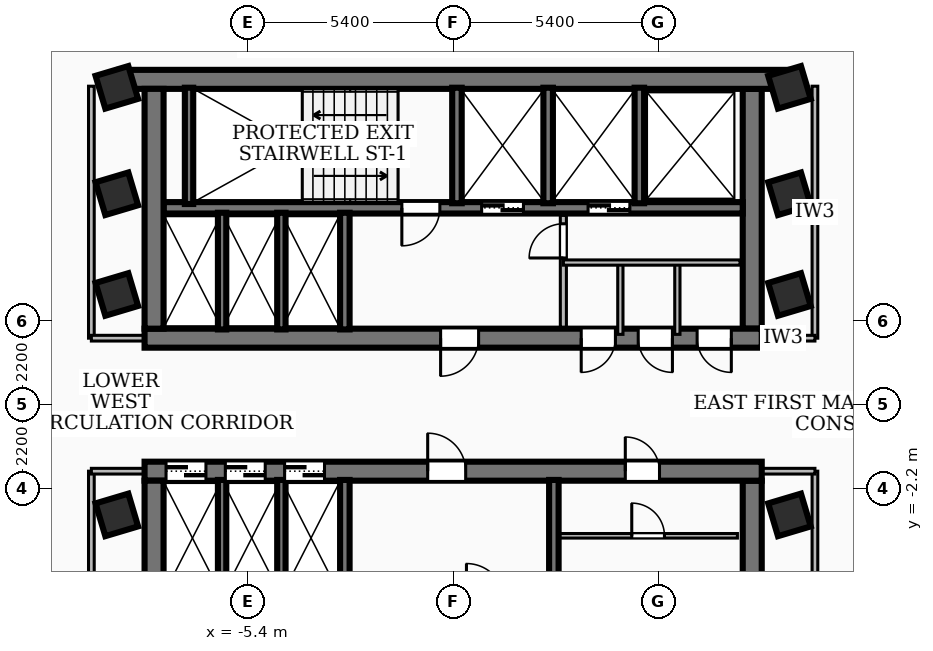
"""IFC4 building model, lengths in metres.
Left out: names, types, materials, properties, quantities, classifications, styles, units other than length and angle.
Written with IfcOpenShell. Run it as: python <this file> out.ifc"""

import sys

from ifc_helpers import new_model, si_unit, direction, frame, frame_2d, origin, origin_2d, place, context, subcontext, project, spatial, rectangle, extrude, element, fill, save


model = new_model("IFC4")
c1 = context("Model", 3, precision=1e-05, world=origin(), true_north=direction((0.0, 1.0)))
c2 = subcontext(c1, "Body", "Model", "MODEL_VIEW")
j1 = project(units=[si_unit("LENGTHUNIT", "METRE"), si_unit("PLANEANGLEUNIT", "RADIAN")], contexts=[c1])
p1 = place(None, origin())
s1 = spatial("IfcSite", under=j1, at=p1, CompositionType="ELEMENT")
p2 = place(p1, origin())
s2 = spatial("IfcBuilding", under=s1, at=p2, CompositionType="ELEMENT")
p3 = place(p2, frame((0.0, 0.0, 141.48)))
s3 = spatial("IfcBuildingStorey", under=s2, at=p3, CompositionType="ELEMENT", Elevation=141.48)
p4 = place(p3, frame((-8.78, 8.56, 0.0), z_axis=(0.0, 0.0, 1.0), x_axis=(1.0, 0.0, 0.0)))
e1 = element("IfcWall", 1, at=p4, inside=s3, PredefinedType="SHEAR", context=c2, shape_type="SweptSolid", body=[
    extrude(rectangle(XDim=17.56, YDim=0.5, at=frame_2d((8.78, 0.0))), origin(), (0.0, 0.0, 1.0), 3.32),
])
p5 = place(p3, frame((8.12, 1.75, 0.0), z_axis=(0.0, 0.0, 1.0), x_axis=(-1.0, 0.0, 0.0)))
e2 = element("IfcWall", 2, at=p5, inside=s3, PredefinedType="SHEAR", context=c2, shape_type="SweptSolid", body=[
    extrude(rectangle(XDim=16.24, YDim=0.5, at=frame_2d((8.12, 0.0))), origin(), (0.0, 0.0, 1.0), 3.32),
])
p6 = place(p5, frame((7.45, 0.0, 0.0)))
e3 = element("IfcOpeningElement", 3, at=p6, cuts=e2, PredefinedType="OPENING", context=c2, shape_type="SweptSolid", body=[
    extrude(rectangle(XDim=1.0, YDim=2.1, at=frame_2d((0.5, 1.05))), frame((0.0, 0.26, 0.0), z_axis=(0.0, -1.0, 0.0), x_axis=(1.0, 0.0, 0.0)), (0.0, 0.0, 1.0), 0.52),
])
p7 = place(p5, frame((3.85, 0.0, 0.0)))
e4 = element("IfcOpeningElement", 4, at=p7, cuts=e2, PredefinedType="OPENING", context=c2, shape_type="SweptSolid", body=[
    extrude(rectangle(XDim=0.9, YDim=2.06, at=frame_2d((0.45, 1.03))), frame((0.0, 0.26, 0.0), z_axis=(0.0, -1.0, 0.0), x_axis=(1.0, 0.0, 0.0)), (0.0, 0.0, 1.0), 0.52),
])
p8 = place(p5, frame((2.35, 0.0, 0.0)))
e5 = element("IfcOpeningElement", 5, at=p8, cuts=e2, PredefinedType="OPENING", context=c2, shape_type="SweptSolid", body=[
    extrude(rectangle(XDim=0.9, YDim=2.06, at=frame_2d((0.45, 1.03))), frame((0.0, 0.26, 0.0), z_axis=(0.0, -1.0, 0.0), x_axis=(1.0, 0.0, 0.0)), (0.0, 0.0, 1.0), 0.52),
])
p9 = place(p5, frame((0.8, 0.0, 0.0)))
e6 = element("IfcOpeningElement", 6, at=p9, cuts=e2, PredefinedType="OPENING", context=c2, shape_type="SweptSolid", body=[
    extrude(rectangle(XDim=0.9, YDim=2.06, at=frame_2d((0.45, 1.03))), frame((0.0, 0.26, 0.0), z_axis=(0.0, -1.0, 0.0), x_axis=(1.0, 0.0, 0.0)), (0.0, 0.0, 1.0), 0.52),
])
for number, where, z_axis, x_axis in (
    (7, (-7.87, 2.0, 0.0), (0.0, 0.0, 1.0), (0.0, 1.0, 0.0)),
    (8, (7.87, 8.31, 0.0), (0.0, 0.0, 1.0), (0.0, -1.0, 0.0)),
):
    element("IfcWall", number, at=place(p3, frame(where, z_axis=z_axis, x_axis=x_axis)), inside=s3, PredefinedType="SHEAR", context=c2, shape_type="SweptSolid", body=[
        extrude(rectangle(XDim=6.31, YDim=0.5, at=frame_2d((3.155, 0.0))), origin(), (0.0, 0.0, 1.0), 3.32),
    ])
p10 = place(p3, frame((7.62, 5.18, 0.0), z_axis=(0.0, 0.0, 1.0), x_axis=(-1.0, 0.0, 0.0)))
e9 = element("IfcWall", 9, at=p10, inside=s3, PredefinedType="SOLIDWALL", context=c2, shape_type="SweptSolid", body=[
    extrude(rectangle(XDim=15.24, YDim=0.3, at=frame_2d((7.62, 0.0))), origin(), (0.0, 0.0, 1.0), 3.32),
])
p11 = place(p10, frame((5.77, 0.0, 0.0)))
e10 = element("IfcOpeningElement", 10, at=p11, cuts=e9, PredefinedType="OPENING", context=c2, shape_type="SweptSolid", body=[
    extrude(rectangle(XDim=1.1, YDim=2.15, at=frame_2d((0.55, 1.075))), frame((0.0, 0.16, 0.0), z_axis=(0.0, -1.0, 0.0), x_axis=(1.0, 0.0, 0.0)), (0.0, 0.0, 1.0), 0.32),
])
p12 = place(p10, frame((2.97, 0.0, 0.0)))
e11 = element("IfcOpeningElement", 11, at=p12, cuts=e9, PredefinedType="OPENING", context=c2, shape_type="SweptSolid", body=[
    extrude(rectangle(XDim=1.1, YDim=2.15, at=frame_2d((0.55, 1.075))), frame((0.0, 0.16, 0.0), z_axis=(0.0, -1.0, 0.0), x_axis=(1.0, 0.0, 0.0)), (0.0, 0.0, 1.0), 0.32),
])
p13 = place(p10, frame((7.97, 0.0, 0.0)))
e12 = element("IfcOpeningElement", 12, at=p13, cuts=e9, PredefinedType="OPENING", context=c2, shape_type="SweptSolid", body=[
    extrude(rectangle(XDim=1.0, YDim=2.1, at=frame_2d((0.5, 1.05))), frame((0.0, 0.16, 0.0), z_axis=(0.0, -1.0, 0.0), x_axis=(1.0, 0.0, 0.0)), (0.0, 0.0, 1.0), 0.32),
])
p14 = place(p3, frame((-8.12, -1.75, 0.0), z_axis=(0.0, 0.0, 1.0), x_axis=(1.0, 0.0, 0.0)))
e13 = element("IfcWall", 13, at=p14, inside=s3, PredefinedType="SHEAR", context=c2, shape_type="SweptSolid", body=[
    extrude(rectangle(XDim=16.24, YDim=0.5, at=frame_2d((8.12, 0.0))), origin(), (0.0, 0.0, 1.0), 3.32),
])
p15 = place(p14, frame((7.45, 0.0, 0.0)))
e14 = element("IfcOpeningElement", 14, at=p15, cuts=e13, PredefinedType="OPENING", context=c2, shape_type="SweptSolid", body=[
    extrude(rectangle(XDim=1.0, YDim=2.1, at=frame_2d((0.5, 1.05))), frame((0.0, 0.26, 0.0), z_axis=(0.0, -1.0, 0.0), x_axis=(1.0, 0.0, 0.0)), (0.0, 0.0, 1.0), 0.52),
])
p16 = place(p14, frame((12.65, 0.0, 0.0)))
e15 = element("IfcOpeningElement", 15, at=p16, cuts=e13, PredefinedType="OPENING", context=c2, shape_type="SweptSolid", body=[
    extrude(rectangle(XDim=0.9, YDim=2.06, at=frame_2d((0.45, 1.03))), frame((0.0, 0.26, 0.0), z_axis=(0.0, -1.0, 0.0), x_axis=(1.0, 0.0, 0.0)), (0.0, 0.0, 1.0), 0.52),
])
p17 = place(p14, frame((0.565, 0.0, 0.0)))
e16 = element("IfcOpeningElement", 16, at=p17, cuts=e13, PredefinedType="OPENING", context=c2, shape_type="SweptSolid", body=[
    extrude(rectangle(XDim=1.05, YDim=2.15, at=frame_2d((0.525, 1.075))), frame((0.0, 0.26, 0.0), z_axis=(0.0, -1.0, 0.0), x_axis=(1.0, 0.0, 0.0)), (0.0, 0.0, 1.0), 0.52),
])
p18 = place(p14, frame((2.125, 0.0, 0.0)))
e17 = element("IfcOpeningElement", 17, at=p18, cuts=e13, PredefinedType="OPENING", context=c2, shape_type="SweptSolid", body=[
    extrude(rectangle(XDim=1.05, YDim=2.15, at=frame_2d((0.525, 1.075))), frame((0.0, 0.26, 0.0), z_axis=(0.0, -1.0, 0.0), x_axis=(1.0, 0.0, 0.0)), (0.0, 0.0, 1.0), 0.52),
])
p19 = place(p14, frame((3.685, 0.0, 0.0)))
e18 = element("IfcOpeningElement", 18, at=p19, cuts=e13, PredefinedType="OPENING", context=c2, shape_type="SweptSolid", body=[
    extrude(rectangle(XDim=1.05, YDim=2.15, at=frame_2d((0.525, 1.075))), frame((0.0, 0.26, 0.0), z_axis=(0.0, -1.0, 0.0), x_axis=(1.0, 0.0, 0.0)), (0.0, 0.0, 1.0), 0.52),
])
for number, where, z_axis, x_axis in (
    (19, (-7.87, -8.31, 0.0), (0.0, 0.0, 1.0), (0.0, 1.0, 0.0)),
    (20, (7.87, -2.0, 0.0), (0.0, 0.0, 1.0), (0.0, -1.0, 0.0)),
):
    element("IfcWall", number, at=place(p3, frame(where, z_axis=z_axis, x_axis=x_axis)), inside=s3, PredefinedType="SHEAR", context=c2, shape_type="SweptSolid", body=[
        extrude(rectangle(XDim=6.31, YDim=0.5, at=frame_2d((3.155, 0.0))), origin(), (0.0, 0.0, 1.0), 3.32),
    ])
p20 = place(p3, frame((-6.95, 5.28, 0.0), z_axis=(0.0, 0.0, 1.0), x_axis=(0.0, 1.0, 0.0)))
e21 = element("IfcWall", 21, at=p20, inside=s3, PredefinedType="SOLIDWALL", context=c2, shape_type="SweptSolid", body=[
    extrude(rectangle(XDim=3.06, YDim=0.22, at=frame_2d((1.53, 0.0))), origin(), (0.0, 0.0, 1.0), 3.32),
])
for number, where, z_axis, x_axis in (
    (22, (0.1, 5.3, 0.0), (0.0, 0.0, 1.0), (0.0, 1.0, 0.0)),
    (23, (2.5, 5.3, 0.0), (0.0, 0.0, 1.0), (0.0, 1.0, 0.0)),
    (24, (4.9, 5.3, 0.0), (0.0, 0.0, 1.0), (0.0, 1.0, 0.0)),
):
    element("IfcWall", number, at=place(p3, frame(where, z_axis=z_axis, x_axis=x_axis)), inside=s3, PredefinedType="SOLIDWALL", context=c2, shape_type="SweptSolid", body=[
        extrude(rectangle(XDim=3.04, YDim=0.25, at=frame_2d((1.52, 0.0))), origin(), (0.0, 0.0, 1.0), 3.32),
    ])
for number, where, z_axis, x_axis in (
    (25, (-2.85, 1.98, 0.0), (0.0, 0.0, 1.0), (0.0, 1.0, 0.0)),
    (26, (-2.85, -5.05, 0.0), (0.0, 0.0, 1.0), (0.0, 1.0, 0.0)),
    (27, (2.65, -5.05, 0.0), (0.0, 0.0, 1.0), (0.0, 1.0, 0.0)),
):
    element("IfcWall", number, at=place(p3, frame(where, z_axis=z_axis, x_axis=x_axis)), inside=s3, PredefinedType="SOLIDWALL", context=c2, shape_type="SweptSolid", body=[
        extrude(rectangle(XDim=3.07, YDim=0.25, at=frame_2d((1.535, 0.0))), origin(), (0.0, 0.0, 1.0), 3.32),
    ])
for number, where, z_axis, x_axis in (
    (28, (-6.08, 1.98, 0.0), (0.0, 0.0, 1.0), (0.0, 1.0, 0.0)),
    (29, (-4.52, 1.98, 0.0), (0.0, 0.0, 1.0), (0.0, 1.0, 0.0)),
    (30, (-6.08, -5.05, 0.0), (0.0, 0.0, 1.0), (0.0, 1.0, 0.0)),
    (31, (-4.52, -5.05, 0.0), (0.0, 0.0, 1.0), (0.0, 1.0, 0.0)),
):
    element("IfcWall", number, at=place(p3, frame(where, z_axis=z_axis, x_axis=x_axis)), inside=s3, PredefinedType="SOLIDWALL", context=c2, shape_type="SweptSolid", body=[
        extrude(rectangle(XDim=3.07, YDim=0.22, at=frame_2d((1.535, 0.0))), origin(), (0.0, 0.0, 1.0), 3.32),
    ])
for number, where, z_axis, x_axis in (
    (32, (-8.85, -2.9, 0.0), (0.0, 0.0, 1.0), (0.958, 0.286, 0.0)),
    (33, (-8.85, 2.9, 0.0), (0.0, 0.0, 1.0), (0.958, 0.286, 0.0)),
    (34, (-8.85, 5.55, 0.0), (0.0, 0.0, 1.0), (0.958, 0.286, 0.0)),
    (35, (8.85, -2.9, 0.0), (0.0, 0.0, 1.0), (0.958, 0.286, 0.0)),
    (36, (8.85, 2.9, 0.0), (0.0, 0.0, 1.0), (0.958, 0.286, 0.0)),
    (37, (8.85, 5.55, 0.0), (0.0, 0.0, 1.0), (0.958, 0.286, 0.0)),
    (38, (-8.85, 8.35, 0.0), (0.0, 0.0, 1.0), (0.958, 0.286, 0.0)),
    (39, (8.85, 8.35, 0.0), (0.0, 0.0, 1.0), (0.958, 0.286, 0.0)),
):
    element("IfcColumn", number, at=place(p3, frame(where, z_axis=z_axis, x_axis=x_axis)), inside=s3, PredefinedType="COLUMN", context=c2, shape_type="SweptSolid", body=[
        extrude(rectangle(XDim=0.9, YDim=0.9, at=origin_2d()), origin(), (0.0, 0.0, 1.0), 3.6),
    ])
p21 = place(p3, frame((2.9, 2.04, 0.0), z_axis=(0.0, 0.0, 1.0), x_axis=(0.0, 1.0, 0.0)))
e40 = element("IfcWall", 40, at=p21, inside=s3, PredefinedType="PARTITIONING", context=c2, shape_type="SweptSolid", body=[
    extrude(rectangle(XDim=2.94, YDim=0.16, at=frame_2d((1.47, 0.0))), origin(), (0.0, 0.0, 1.0), 2.55),
])
p22 = place(p21, frame((1.82, 0.0, 0.0)))
e41 = element("IfcOpeningElement", 41, at=p22, cuts=e40, PredefinedType="OPENING", context=c2, shape_type="SweptSolid", body=[
    extrude(rectangle(XDim=0.9, YDim=2.06, at=frame_2d((0.45, 1.03))), frame((0.0, 0.09, 0.0), z_axis=(0.0, -1.0, 0.0), x_axis=(1.0, 0.0, 0.0)), (0.0, 0.0, 1.0), 0.18),
])
p23 = place(p3, frame((2.9, 3.74, 0.0), z_axis=(0.0, 0.0, 1.0), x_axis=(1.0, 0.0, 0.0)))
e42 = element("IfcWall", 42, at=p23, inside=s3, PredefinedType="PARTITIONING", context=c2, shape_type="SweptSolid", body=[
    extrude(rectangle(XDim=4.65, YDim=0.138, at=frame_2d((2.325, 0.0))), origin(), (0.0, 0.0, 1.0), 3.32),
])
p24 = place(p3, frame((2.8, -3.45, 0.0), z_axis=(0.0, 0.0, 1.0), x_axis=(1.0, 0.0, 0.0)))
e43 = element("IfcWall", 43, at=p24, inside=s3, PredefinedType="PARTITIONING", context=c2, shape_type="SweptSolid", body=[
    extrude(rectangle(XDim=4.68, YDim=0.12, at=frame_2d((2.34, 0.0))), origin(), (0.0, 0.0, 1.0), 3.32),
])
p25 = place(p24, frame((1.9, 0.0, 0.0)))
e44 = element("IfcOpeningElement", 44, at=p25, cuts=e43, PredefinedType="OPENING", context=c2, shape_type="SweptSolid", body=[
    extrude(rectangle(XDim=0.86, YDim=2.04, at=frame_2d((0.43, 1.02))), frame((0.0, 0.07, 0.0), z_axis=(0.0, -1.0, 0.0), x_axis=(1.0, 0.0, 0.0)), (0.0, 0.0, 1.0), 0.14),
])
for number, where, z_axis, x_axis in (
    (45, (4.4, 1.85, 0.0), (0.0, 0.0, 1.0), (0.0, 1.0, 0.0)),
    (46, (5.9, 1.85, 0.0), (0.0, 0.0, 1.0), (0.0, 1.0, 0.0)),
):
    element("IfcWall", number, at=place(p3, frame(where, z_axis=z_axis, x_axis=x_axis)), inside=s3, PredefinedType="PARTITIONING", context=c2, shape_type="SweptSolid", body=[
        extrude(rectangle(XDim=1.89, YDim=0.138, at=frame_2d((0.945, 0.0))), origin(), (0.0, 0.0, 1.0), 2.55),
    ])
p26 = place(p3, frame((-9.52, 1.75, 0.0), z_axis=(0.0, 0.0, 1.0), x_axis=(0.0, 1.0, 0.0)))
e47 = element("IfcWall", 47, at=p26, inside=s3, PredefinedType="PARTITIONING", context=c2, shape_type="SweptSolid", body=[
    extrude(rectangle(XDim=6.63, YDim=0.15, at=frame_2d((3.315, 0.0))), origin(), (0.0, 0.0, 1.0), 2.55),
])
p27 = place(p3, frame((-7.85, 1.75, 0.0), z_axis=(0.0, 0.0, 1.0), x_axis=(-1.0, 0.0, 0.0)))
e48 = element("IfcWall", 48, at=p27, inside=s3, PredefinedType="PARTITIONING", context=c2, shape_type="SweptSolid", body=[
    extrude(rectangle(XDim=1.67, YDim=0.15, at=frame_2d((0.835, 0.0))), origin(), (0.0, 0.0, 1.0), 2.55),
])
p28 = place(p3, frame((-9.52, -8.38, 0.0), z_axis=(0.0, 0.0, 1.0), x_axis=(0.0, 1.0, 0.0)))
e49 = element("IfcWall", 49, at=p28, inside=s3, PredefinedType="PARTITIONING", context=c2, shape_type="SweptSolid", body=[
    extrude(rectangle(XDim=6.63, YDim=0.15, at=frame_2d((3.315, 0.0))), origin(), (0.0, 0.0, 1.0), 2.55),
])
p29 = place(p3, frame((-7.85, -1.75, 0.0), z_axis=(0.0, 0.0, 1.0), x_axis=(-1.0, 0.0, 0.0)))
e50 = element("IfcWall", 50, at=p29, inside=s3, PredefinedType="PARTITIONING", context=c2, shape_type="SweptSolid", body=[
    extrude(rectangle(XDim=1.67, YDim=0.15, at=frame_2d((0.835, 0.0))), origin(), (0.0, 0.0, 1.0), 2.55),
])
p30 = place(p3, frame((9.52, 1.75, 0.0), z_axis=(0.0, 0.0, 1.0), x_axis=(0.0, 1.0, 0.0)))
e51 = element("IfcWall", 51, at=p30, inside=s3, PredefinedType="PARTITIONING", context=c2, shape_type="SweptSolid", body=[
    extrude(rectangle(XDim=6.63, YDim=0.15, at=frame_2d((3.315, 0.0))), origin(), (0.0, 0.0, 1.0), 2.55),
])
p31 = place(p3, frame((7.85, 1.75, 0.0), z_axis=(0.0, 0.0, 1.0), x_axis=(1.0, 0.0, 0.0)))
e52 = element("IfcWall", 52, at=p31, inside=s3, PredefinedType="PARTITIONING", context=c2, shape_type="SweptSolid", body=[
    extrude(rectangle(XDim=1.67, YDim=0.15, at=frame_2d((0.835, 0.0))), origin(), (0.0, 0.0, 1.0), 2.55),
])
p32 = place(p3, frame((9.52, -8.38, 0.0), z_axis=(0.0, 0.0, 1.0), x_axis=(0.0, 1.0, 0.0)))
e53 = element("IfcWall", 53, at=p32, inside=s3, PredefinedType="PARTITIONING", context=c2, shape_type="SweptSolid", body=[
    extrude(rectangle(XDim=6.63, YDim=0.15, at=frame_2d((3.315, 0.0))), origin(), (0.0, 0.0, 1.0), 2.55),
])
p33 = place(p3, frame((7.85, -1.75, 0.0), z_axis=(0.0, 0.0, 1.0), x_axis=(1.0, 0.0, 0.0)))
e54 = element("IfcWall", 54, at=p33, inside=s3, PredefinedType="PARTITIONING", context=c2, shape_type="SweptSolid", body=[
    extrude(rectangle(XDim=1.67, YDim=0.15, at=frame_2d((0.835, 0.0))), origin(), (0.0, 0.0, 1.0), 2.55),
])
p34 = place(p6, origin())
e55 = element("IfcDoor", 55, at=p34, inside=s3, OperationType="SINGLE_SWING_RIGHT", PredefinedType="DOOR", context=c2, shape_type="SweptSolid", body=[
    extrude(rectangle(XDim=1.0, YDim=2.1, at=frame_2d((0.5, 1.05))), frame((0.0, 0.025, 0.0), z_axis=(0.0, -1.0, 0.0), x_axis=(1.0, 0.0, 0.0)), (0.0, 0.0, 1.0), 0.05),
])
fill(e3, e55)
p35 = place(p15, origin())
e56 = element("IfcDoor", 56, at=p35, inside=s3, OperationType="SINGLE_SWING_LEFT", PredefinedType="DOOR", context=c2, shape_type="SweptSolid", body=[
    extrude(rectangle(XDim=1.0, YDim=2.1, at=frame_2d((0.5, 1.05))), frame((0.0, 0.025, 0.0), z_axis=(0.0, -1.0, 0.0), x_axis=(1.0, 0.0, 0.0)), (0.0, 0.0, 1.0), 0.05),
])
fill(e14, e56)
p36 = place(p11, origin())
e57 = element("IfcDoor", 57, at=p36, inside=s3, OperationType="DOUBLE_DOOR_SLIDING", PredefinedType="DOOR", context=c2, shape_type="SweptSolid", body=[
    extrude(rectangle(XDim=1.1, YDim=2.15, at=frame_2d((0.55, 1.075))), frame((0.0, 0.025, 0.0), z_axis=(0.0, -1.0, 0.0), x_axis=(1.0, 0.0, 0.0)), (0.0, 0.0, 1.0), 0.05),
])
fill(e10, e57)
p37 = place(p12, origin())
e58 = element("IfcDoor", 58, at=p37, inside=s3, OperationType="DOUBLE_DOOR_SLIDING", PredefinedType="DOOR", context=c2, shape_type="SweptSolid", body=[
    extrude(rectangle(XDim=1.1, YDim=2.15, at=frame_2d((0.55, 1.075))), frame((0.0, 0.025, 0.0), z_axis=(0.0, -1.0, 0.0), x_axis=(1.0, 0.0, 0.0)), (0.0, 0.0, 1.0), 0.05),
])
fill(e11, e58)
p38 = place(p13, origin())
e59 = element("IfcDoor", 59, at=p38, inside=s3, OperationType="SINGLE_SWING_RIGHT", PredefinedType="DOOR", context=c2, shape_type="SweptSolid", body=[
    extrude(rectangle(XDim=1.0, YDim=2.1, at=frame_2d((0.5, 1.05))), frame((0.0, 0.025, 0.0), z_axis=(0.0, -1.0, 0.0), x_axis=(1.0, 0.0, 0.0)), (0.0, 0.0, 1.0), 0.05),
])
fill(e12, e59)
p39 = place(p16, origin())
e60 = element("IfcDoor", 60, at=p39, inside=s3, OperationType="SINGLE_SWING_LEFT", PredefinedType="DOOR", context=c2, shape_type="SweptSolid", body=[
    extrude(rectangle(XDim=0.9, YDim=2.06, at=frame_2d((0.45, 1.03))), frame((0.0, 0.025, 0.0), z_axis=(0.0, -1.0, 0.0), x_axis=(1.0, 0.0, 0.0)), (0.0, 0.0, 1.0), 0.05),
])
fill(e15, e60)
p40 = place(p17, origin())
e61 = element("IfcDoor", 61, at=p40, inside=s3, OperationType="DOUBLE_DOOR_SLIDING", PredefinedType="DOOR", context=c2, shape_type="SweptSolid", body=[
    extrude(rectangle(XDim=1.05, YDim=2.15, at=frame_2d((0.525, 1.075))), frame((0.0, 0.025, 0.0), z_axis=(0.0, -1.0, 0.0), x_axis=(1.0, 0.0, 0.0)), (0.0, 0.0, 1.0), 0.05),
])
fill(e16, e61)
p41 = place(p18, origin())
e62 = element("IfcDoor", 62, at=p41, inside=s3, OperationType="DOUBLE_DOOR_SLIDING", PredefinedType="DOOR", context=c2, shape_type="SweptSolid", body=[
    extrude(rectangle(XDim=1.05, YDim=2.15, at=frame_2d((0.525, 1.075))), frame((0.0, 0.025, 0.0), z_axis=(0.0, -1.0, 0.0), x_axis=(1.0, 0.0, 0.0)), (0.0, 0.0, 1.0), 0.05),
])
fill(e17, e62)
p42 = place(p19, origin())
e63 = element("IfcDoor", 63, at=p42, inside=s3, OperationType="DOUBLE_DOOR_SLIDING", PredefinedType="DOOR", context=c2, shape_type="SweptSolid", body=[
    extrude(rectangle(XDim=1.05, YDim=2.15, at=frame_2d((0.525, 1.075))), frame((0.0, 0.025, 0.0), z_axis=(0.0, -1.0, 0.0), x_axis=(1.0, 0.0, 0.0)), (0.0, 0.0, 1.0), 0.05),
])
fill(e18, e63)
p43 = place(p7, origin())
e64 = element("IfcDoor", 64, at=p43, inside=s3, OperationType="SINGLE_SWING_RIGHT", PredefinedType="DOOR", context=c2, shape_type="SweptSolid", body=[
    extrude(rectangle(XDim=0.9, YDim=2.06, at=frame_2d((0.45, 1.03))), frame((0.0, 0.025, 0.0), z_axis=(0.0, -1.0, 0.0), x_axis=(1.0, 0.0, 0.0)), (0.0, 0.0, 1.0), 0.05),
])
fill(e4, e64)
p44 = place(p8, origin())
e65 = element("IfcDoor", 65, at=p44, inside=s3, OperationType="SINGLE_SWING_LEFT", PredefinedType="DOOR", context=c2, shape_type="SweptSolid", body=[
    extrude(rectangle(XDim=0.9, YDim=2.06, at=frame_2d((0.45, 1.03))), frame((0.0, 0.025, 0.0), z_axis=(0.0, -1.0, 0.0), x_axis=(1.0, 0.0, 0.0)), (0.0, 0.0, 1.0), 0.05),
])
fill(e5, e65)
p45 = place(p9, origin())
e66 = element("IfcDoor", 66, at=p45, inside=s3, OperationType="SINGLE_SWING_LEFT", PredefinedType="DOOR", context=c2, shape_type="SweptSolid", body=[
    extrude(rectangle(XDim=0.9, YDim=2.06, at=frame_2d((0.45, 1.03))), frame((0.0, 0.025, 0.0), z_axis=(0.0, -1.0, 0.0), x_axis=(1.0, 0.0, 0.0)), (0.0, 0.0, 1.0), 0.05),
])
fill(e6, e66)
p46 = place(p22, origin())
e67 = element("IfcDoor", 67, at=p46, inside=s3, OperationType="SINGLE_SWING_LEFT", PredefinedType="DOOR", context=c2, shape_type="SweptSolid", body=[
    extrude(rectangle(XDim=0.9, YDim=2.06, at=frame_2d((0.45, 1.03))), frame((0.0, 0.025, 0.0), z_axis=(0.0, -1.0, 0.0), x_axis=(1.0, 0.0, 0.0)), (0.0, 0.0, 1.0), 0.05),
])
fill(e41, e67)
p47 = place(p25, origin())
e68 = element("IfcDoor", 68, at=p47, inside=s3, OperationType="SINGLE_SWING_LEFT", PredefinedType="DOOR", context=c2, shape_type="SweptSolid", body=[
    extrude(rectangle(XDim=0.86, YDim=2.04, at=frame_2d((0.43, 1.02))), frame((0.0, 0.025, 0.0), z_axis=(0.0, -1.0, 0.0), x_axis=(1.0, 0.0, 0.0)), (0.0, 0.0, 1.0), 0.05),
])
fill(e44, e68)
save(model, sys.argv[1])
